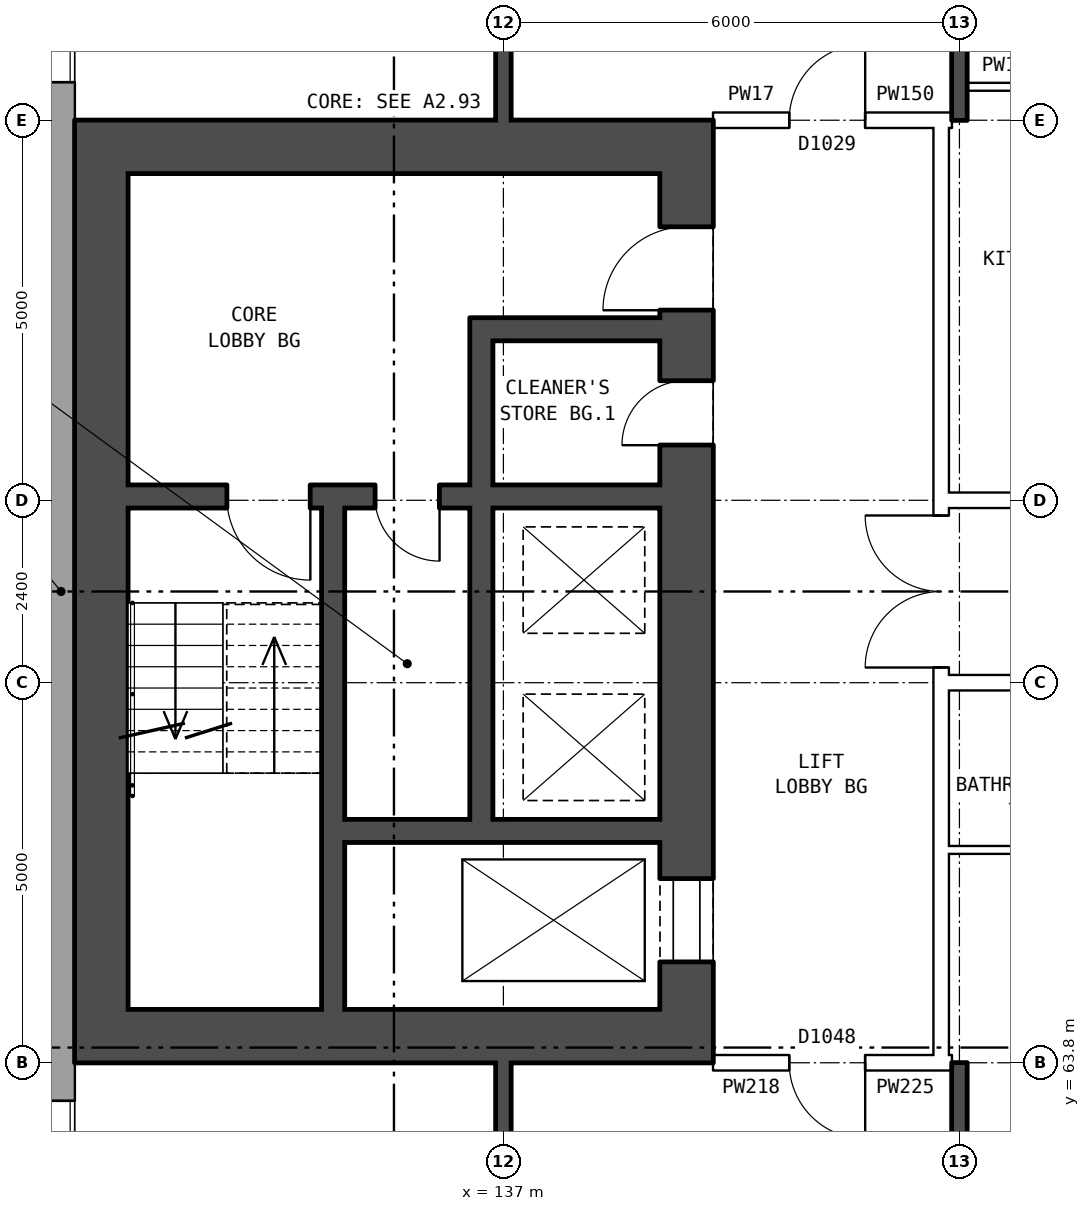
"""IFC4 building model, lengths in metres.
Left out: names, types, materials, properties, quantities, classifications, styles, units other than length and angle.
Written with IfcOpenShell. Run it as: python <this file> out.ifc"""

import sys

from ifc_helpers import new_model, si_unit, direction, frame, frame_2d, origin, place, context, subcontext, project, spatial, rectangle, extrude, element, fill, save


model = new_model("IFC4")
c1 = context("Model", 3, precision=1e-05, world=origin(), true_north=direction((0.0, 1.0)))
c2 = subcontext(c1, "Body", "Model", "MODEL_VIEW")
j1 = project(units=[si_unit("LENGTHUNIT", "METRE"), si_unit("PLANEANGLEUNIT", "RADIAN")], contexts=[c1])
p1 = place(None, origin())
s1 = spatial("IfcSite", under=j1, at=p1, CompositionType="ELEMENT")
p2 = place(p1, origin())
s2 = spatial("IfcBuilding", under=s1, at=p2, CompositionType="ELEMENT")
p3 = place(p2, frame((0.0, 0.0, 84.0)))
s3 = spatial("IfcBuildingStorey", under=s2, at=p3, CompositionType="ELEMENT", Elevation=84.0)
p4 = place(p3, frame((131.18, 82.925, 0.0), z_axis=(0.0, 0.0, 1.0), x_axis=(0.0, -1.0, 0.0)))
e1 = element("IfcWall", 1, at=p4, inside=s3, PredefinedType="STANDARD", context=c2, shape_type="SweptSolid", body=[
    extrude(rectangle(XDim=25.851, YDim=0.36, at=frame_2d((12.925, 0.0))), origin(), (0.0, 0.0, 1.0), 2.85),
])
p5 = place(p4, frame((1.075, 0.0, 0.8)))
e2 = element("IfcOpeningElement", 2, at=p5, cuts=e1, PredefinedType="OPENING", context=c2, shape_type="SweptSolid", body=[
    extrude(rectangle(XDim=1.2, YDim=1.2, at=frame_2d((0.6, 0.6))), frame((0.0, 0.19, 0.0), z_axis=(0.0, -1.0, 0.0), x_axis=(1.0, 0.0, 0.0)), (0.0, 0.0, 1.0), 0.38),
])
p6 = place(p4, frame((4.625, 0.0, 0.8)))
e3 = element("IfcOpeningElement", 3, at=p6, cuts=e1, PredefinedType="OPENING", context=c2, shape_type="SweptSolid", body=[
    extrude(rectangle(XDim=1.6, YDim=1.8, at=frame_2d((0.8, 0.9))), frame((0.0, 0.19, 0.0), z_axis=(0.0, -1.0, 0.0), x_axis=(1.0, 0.0, 0.0)), (0.0, 0.0, 1.0), 0.38),
])
p7 = place(p4, frame((19.625, 0.0, 0.8)))
e4 = element("IfcOpeningElement", 4, at=p7, cuts=e1, PredefinedType="OPENING", context=c2, shape_type="SweptSolid", body=[
    extrude(rectangle(XDim=1.6, YDim=1.8, at=frame_2d((0.8, 0.9))), frame((0.0, 0.19, 0.0), z_axis=(0.0, -1.0, 0.0), x_axis=(1.0, 0.0, 0.0)), (0.0, 0.0, 1.0), 0.38),
])
p8 = place(p4, frame((21.525, 0.0, 1.7)))
e5 = element("IfcOpeningElement", 5, at=p8, cuts=e1, PredefinedType="OPENING", context=c2, shape_type="SweptSolid", body=[
    extrude(rectangle(XDim=0.6, YDim=0.9, at=frame_2d((0.3, 0.45))), frame((0.0, 0.19, 0.0), z_axis=(0.0, -1.0, 0.0), x_axis=(1.0, 0.0, 0.0)), (0.0, 0.0, 1.0), 0.38),
])
p9 = place(p4, frame((3.725, 0.0, 1.7)))
e6 = element("IfcOpeningElement", 6, at=p9, cuts=e1, PredefinedType="OPENING", context=c2, shape_type="SweptSolid", body=[
    extrude(rectangle(XDim=0.6, YDim=0.9, at=frame_2d((0.3, 0.45))), frame((0.0, 0.19, 0.0), z_axis=(0.0, -1.0, 0.0), x_axis=(1.0, 0.0, 0.0)), (0.0, 0.0, 1.0), 0.38),
])
p10 = place(p4, frame((23.125, 0.0, 0.8)))
e7 = element("IfcOpeningElement", 7, at=p10, cuts=e1, PredefinedType="OPENING", context=c2, shape_type="SweptSolid", body=[
    extrude(rectangle(XDim=1.6, YDim=0.9, at=frame_2d((0.8, 0.45))), frame((0.0, 0.19, 0.0), z_axis=(0.0, -1.0, 0.0), x_axis=(1.0, 0.0, 0.0)), (0.0, 0.0, 1.0), 0.38),
])
p11 = place(p3, frame((139.41, 64.5, 0.0), z_axis=(0.0, 0.0, 1.0), x_axis=(0.0, 1.0, 0.0)))
e8 = element("IfcWall", 8, at=p11, inside=s3, PredefinedType="SHEAR", context=c2, shape_type="SweptSolid", body=[
    extrude(rectangle(XDim=11.0, YDim=0.7, at=frame_2d((5.5, 0.0))), origin(), (0.0, 0.0, 1.0), 2.85),
])
p12 = place(p11, frame((0.625, 0.0, 0.0)))
e9 = element("IfcOpeningElement", 9, at=p12, cuts=e8, PredefinedType="OPENING", context=c2, shape_type="SweptSolid", body=[
    extrude(rectangle(XDim=1.1, YDim=2.1, at=frame_2d((0.55, 1.05))), frame((0.0, 0.36, 0.0), z_axis=(0.0, -1.0, 0.0), x_axis=(1.0, 0.0, 0.0)), (0.0, 0.0, 1.0), 0.72),
])
p13 = place(p11, frame((9.2, 0.0, 0.0)))
e10 = element("IfcOpeningElement", 10, at=p13, cuts=e8, PredefinedType="OPENING", context=c2, shape_type="SweptSolid", body=[
    extrude(rectangle(XDim=1.1, YDim=2.1, at=frame_2d((0.55, 1.05))), frame((0.0, 0.36, 0.0), z_axis=(0.0, -1.0, 0.0), x_axis=(1.0, 0.0, 0.0)), (0.0, 0.0, 1.0), 0.72),
])
p14 = place(p11, frame((7.425, 0.0, 0.0)))
e11 = element("IfcOpeningElement", 11, at=p14, cuts=e8, PredefinedType="OPENING", context=c2, shape_type="SweptSolid", body=[
    extrude(rectangle(XDim=0.85, YDim=2.1, at=frame_2d((0.425, 1.05))), frame((0.0, 0.36, 0.0), z_axis=(0.0, -1.0, 0.0), x_axis=(1.0, 0.0, 0.0)), (0.0, 0.0, 1.0), 0.72),
])
p15 = place(p3, frame((131.71, 64.5, 0.0), z_axis=(0.0, 0.0, 1.0), x_axis=(0.0, 1.0, 0.0)))
e12 = element("IfcWall", 12, at=p15, inside=s3, PredefinedType="SHEAR", context=c2, shape_type="SweptSolid", body=[
    extrude(rectangle(XDim=11.0, YDim=0.7, at=frame_2d((5.5, 0.0))), origin(), (0.0, 0.0, 1.0), 2.85),
])
for number, where, z_axis, x_axis in (
    (13, (139.76, 64.15, 0.0), (0.0, 0.0, 1.0), (-1.0, 0.0, 0.0)),
    (14, (139.76, 75.85, 0.0), (0.0, 0.0, 1.0), (-1.0, 0.0, 0.0)),
):
    element("IfcWall", number, at=place(p3, frame(where, z_axis=z_axis, x_axis=x_axis)), inside=s3, PredefinedType="SHEAR", context=c2, shape_type="SweptSolid", body=[
        extrude(rectangle(XDim=8.4, YDim=0.7, at=frame_2d((4.2, 0.0))), origin(), (0.0, 0.0, 1.0), 2.85),
    ])
p16 = place(p3, frame((139.06, 66.85, 0.0), z_axis=(0.0, 0.0, 1.0), x_axis=(-1.0, 0.0, 0.0)))
e15 = element("IfcWall", 15, at=p16, inside=s3, PredefinedType="SHEAR", context=c2, shape_type="SweptSolid", body=[
    extrude(rectangle(XDim=4.15, YDim=0.3, at=frame_2d((2.075, 0.0))), origin(), (0.0, 0.0, 1.0), 2.85),
])
p17 = place(p3, frame((139.06, 71.25, 0.0), z_axis=(0.0, 0.0, 1.0), x_axis=(-1.0, 0.0, 0.0)))
e16 = element("IfcWall", 16, at=p17, inside=s3, PredefinedType="SHEAR", context=c2, shape_type="SweptSolid", body=[
    extrude(rectangle(XDim=7.0, YDim=0.3, at=frame_2d((3.5, 0.0))), origin(), (0.0, 0.0, 1.0), 2.85),
])
p18 = place(p17, frame((4.6, 0.0, 0.0)))
e17 = element("IfcOpeningElement", 17, at=p18, cuts=e16, PredefinedType="OPENING", context=c2, shape_type="SweptSolid", body=[
    extrude(rectangle(XDim=1.1, YDim=2.1, at=frame_2d((0.55, 1.05))), frame((0.0, 0.16, 0.0), z_axis=(0.0, -1.0, 0.0), x_axis=(1.0, 0.0, 0.0)), (0.0, 0.0, 1.0), 0.32),
])
p19 = place(p17, frame((2.9, 0.0, 0.0)))
e18 = element("IfcOpeningElement", 18, at=p19, cuts=e16, PredefinedType="OPENING", context=c2, shape_type="SweptSolid", body=[
    extrude(rectangle(XDim=0.85, YDim=2.1, at=frame_2d((0.425, 1.05))), frame((0.0, 0.16, 0.0), z_axis=(0.0, -1.0, 0.0), x_axis=(1.0, 0.0, 0.0)), (0.0, 0.0, 1.0), 0.32),
])
p20 = place(p3, frame((139.06, 73.45, 0.0), z_axis=(0.0, 0.0, 1.0), x_axis=(-1.0, 0.0, 0.0)))
e19 = element("IfcWall", 19, at=p20, inside=s3, PredefinedType="SHEAR", context=c2, shape_type="SweptSolid", body=[
    extrude(rectangle(XDim=2.2, YDim=0.3, at=frame_2d((1.1, 0.0))), origin(), (0.0, 0.0, 1.0), 2.85),
])
p21 = place(p3, frame((136.71, 67.0, 0.0), z_axis=(0.0, 0.0, 1.0), x_axis=(0.0, 1.0, 0.0)))
e20 = element("IfcWall", 20, at=p21, inside=s3, PredefinedType="SHEAR", context=c2, shape_type="SweptSolid", body=[
    extrude(rectangle(XDim=4.1, YDim=0.3, at=frame_2d((2.05, 0.0))), origin(), (0.0, 0.0, 1.0), 2.85),
])
p22 = place(p3, frame((136.71, 71.4, 0.0), z_axis=(0.0, 0.0, 1.0), x_axis=(0.0, 1.0, 0.0)))
e21 = element("IfcWall", 21, at=p22, inside=s3, PredefinedType="SHEAR", context=c2, shape_type="SweptSolid", body=[
    extrude(rectangle(XDim=2.2, YDim=0.3, at=frame_2d((1.1, 0.0))), origin(), (0.0, 0.0, 1.0), 2.85),
])
p23 = place(p3, frame((134.76, 64.5, 0.0), z_axis=(0.0, 0.0, 1.0), x_axis=(0.0, 1.0, 0.0)))
e22 = element("IfcWall", 22, at=p23, inside=s3, PredefinedType="SHEAR", context=c2, shape_type="SweptSolid", body=[
    extrude(rectangle(XDim=6.6, YDim=0.3, at=frame_2d((3.3, 0.0))), origin(), (0.0, 0.0, 1.0), 2.85),
])
p24 = place(p3, frame((142.76, 63.9, 0.0), z_axis=(0.0, 0.0, 1.0), x_axis=(0.0, 1.0, 0.0)))
e23 = element("IfcWall", 23, at=p24, inside=s3, PredefinedType="PARTITIONING", context=c2, shape_type="SweptSolid", body=[
    extrude(rectangle(XDim=12.2, YDim=0.2, at=frame_2d((6.1, 0.0))), origin(), (0.0, 0.0, 1.0), 2.85),
])
p25 = place(p24, frame((5.1, 0.0, 0.0)))
e24 = element("IfcOpeningElement", 24, at=p25, cuts=e23, PredefinedType="OPENING", context=c2, shape_type="SweptSolid", body=[
    extrude(rectangle(XDim=2.0, YDim=2.1, at=frame_2d((1.0, 1.05))), frame((0.0, 0.11, 0.0), z_axis=(0.0, -1.0, 0.0), x_axis=(1.0, 0.0, 0.0)), (0.0, 0.0, 1.0), 0.22),
])
p26 = place(p3, frame((139.76, 63.8, 0.0), z_axis=(0.0, 0.0, 1.0), x_axis=(1.0, 0.0, 0.0)))
e25 = element("IfcWall", 25, at=p26, inside=s3, PredefinedType="PARTITIONING", context=c2, shape_type="SweptSolid", body=[
    extrude(rectangle(XDim=3.0, YDim=0.2, at=frame_2d((1.5, 0.0))), origin(), (0.0, 0.0, 1.0), 2.85),
])
p27 = place(p26, frame((1.0, 0.0, 0.0)))
e26 = element("IfcOpeningElement", 26, at=p27, cuts=e25, PredefinedType="OPENING", context=c2, shape_type="SweptSolid", body=[
    extrude(rectangle(XDim=1.0, YDim=2.1, at=frame_2d((0.5, 1.05))), frame((0.0, 0.11, 0.0), z_axis=(0.0, -1.0, 0.0), x_axis=(1.0, 0.0, 0.0)), (0.0, 0.0, 1.0), 0.22),
])
p28 = place(p3, frame((142.76, 63.8, 0.0), z_axis=(0.0, 0.0, 1.0), x_axis=(1.0, 0.0, 0.0)))
e27 = element("IfcWall", 27, at=p28, inside=s3, PredefinedType="PARTITIONING", context=c2, shape_type="SweptSolid", body=[
    extrude(rectangle(XDim=0.14, YDim=0.2, at=frame_2d((0.07, 0.0))), origin(), (0.0, 0.0, 1.0), 2.85),
])
p29 = place(p3, frame((142.76, 66.6, 0.0), z_axis=(0.0, 0.0, 1.0), x_axis=(1.0, 0.0, 0.0)))
e28 = element("IfcWall", 28, at=p29, inside=s3, PredefinedType="PARTITIONING", context=c2, shape_type="SweptSolid", body=[
    extrude(rectangle(XDim=3.24, YDim=0.1, at=frame_2d((1.62, 0.0))), origin(), (0.0, 0.0, 1.0), 2.85),
])
p30 = place(p3, frame((142.76, 68.8, 0.0), z_axis=(0.0, 0.0, 1.0), x_axis=(1.0, 0.0, 0.0)))
e29 = element("IfcWall", 29, at=p30, inside=s3, PredefinedType="PARTITIONING", context=c2, shape_type="SweptSolid", body=[
    extrude(rectangle(XDim=14.48, YDim=0.2, at=frame_2d((7.24, 0.0))), origin(), (0.0, 0.0, 1.0), 2.85),
])
p31 = place(p30, frame((4.24, 0.0, 0.0)))
e30 = element("IfcOpeningElement", 30, at=p31, cuts=e29, PredefinedType="OPENING", context=c2, shape_type="SweptSolid", body=[
    extrude(rectangle(XDim=1.0, YDim=2.1, at=frame_2d((0.5, 1.05))), frame((0.0, 0.11, 0.0), z_axis=(0.0, -1.0, 0.0), x_axis=(1.0, 0.0, 0.0)), (0.0, 0.0, 1.0), 0.22),
])
p32 = place(p30, frame((10.24, 0.0, 0.0)))
e31 = element("IfcOpeningElement", 31, at=p32, cuts=e29, PredefinedType="OPENING", context=c2, shape_type="SweptSolid", body=[
    extrude(rectangle(XDim=1.0, YDim=2.1, at=frame_2d((0.5, 1.05))), frame((0.0, 0.11, 0.0), z_axis=(0.0, -1.0, 0.0), x_axis=(1.0, 0.0, 0.0)), (0.0, 0.0, 1.0), 0.22),
])
p33 = place(p3, frame((142.76, 71.2, 0.0), z_axis=(0.0, 0.0, 1.0), x_axis=(1.0, 0.0, 0.0)))
e32 = element("IfcWall", 32, at=p33, inside=s3, PredefinedType="PARTITIONING", context=c2, shape_type="SweptSolid", body=[
    extrude(rectangle(XDim=14.48, YDim=0.2, at=frame_2d((7.24, 0.0))), origin(), (0.0, 0.0, 1.0), 2.85),
])
p34 = place(p33, frame((1.12, 0.0, 0.0)))
e33 = element("IfcOpeningElement", 33, at=p34, cuts=e32, PredefinedType="OPENING", context=c2, shape_type="SweptSolid", body=[
    extrude(rectangle(XDim=1.0, YDim=2.1, at=frame_2d((0.5, 1.05))), frame((0.0, 0.11, 0.0), z_axis=(0.0, -1.0, 0.0), x_axis=(1.0, 0.0, 0.0)), (0.0, 0.0, 1.0), 0.22),
])
p35 = place(p33, frame((10.24, 0.0, 0.0)))
e34 = element("IfcOpeningElement", 34, at=p35, cuts=e32, PredefinedType="OPENING", context=c2, shape_type="SweptSolid", body=[
    extrude(rectangle(XDim=1.0, YDim=2.1, at=frame_2d((0.5, 1.05))), frame((0.0, 0.11, 0.0), z_axis=(0.0, -1.0, 0.0), x_axis=(1.0, 0.0, 0.0)), (0.0, 0.0, 1.0), 0.22),
])
p36 = place(p3, frame((139.76, 76.2, 0.0), z_axis=(0.0, 0.0, 1.0), x_axis=(1.0, 0.0, 0.0)))
e35 = element("IfcWall", 35, at=p36, inside=s3, PredefinedType="PARTITIONING", context=c2, shape_type="SweptSolid", body=[
    extrude(rectangle(XDim=3.0, YDim=0.2, at=frame_2d((1.5, 0.0))), origin(), (0.0, 0.0, 1.0), 2.85),
])
p37 = place(p36, frame((1.0, 0.0, 0.0)))
e36 = element("IfcOpeningElement", 36, at=p37, cuts=e35, PredefinedType="OPENING", context=c2, shape_type="SweptSolid", body=[
    extrude(rectangle(XDim=1.0, YDim=2.1, at=frame_2d((0.5, 1.05))), frame((0.0, 0.11, 0.0), z_axis=(0.0, -1.0, 0.0), x_axis=(1.0, 0.0, 0.0)), (0.0, 0.0, 1.0), 0.22),
])
p38 = place(p3, frame((142.76, 76.2, 0.0), z_axis=(0.0, 0.0, 1.0), x_axis=(1.0, 0.0, 0.0)))
e37 = element("IfcWall", 37, at=p38, inside=s3, PredefinedType="PARTITIONING", context=c2, shape_type="SweptSolid", body=[
    extrude(rectangle(XDim=0.14, YDim=0.2, at=frame_2d((0.07, 0.0))), origin(), (0.0, 0.0, 1.0), 2.85),
])
p39 = place(p3, frame((143.1, 76.64, 0.0), z_axis=(0.0, 0.0, 1.0), x_axis=(1.0, 0.0, 0.0)))
e38 = element("IfcWall", 38, at=p39, inside=s3, PredefinedType="PARTITIONING", context=c2, shape_type="SweptSolid", body=[
    extrude(rectangle(XDim=2.9, YDim=0.1, at=frame_2d((1.45, 0.0))), origin(), (0.0, 0.0, 1.0), 2.85),
])
p40 = place(p39, frame((1.0, 0.0, 0.0)))
e39 = element("IfcOpeningElement", 39, at=p40, cuts=e38, PredefinedType="OPENING", context=c2, shape_type="SweptSolid", body=[
    extrude(rectangle(XDim=0.9, YDim=2.1, at=frame_2d((0.45, 1.05))), frame((0.0, 0.06, 0.0), z_axis=(0.0, -1.0, 0.0), x_axis=(1.0, 0.0, 0.0)), (0.0, 0.0, 1.0), 0.12),
])
p41 = place(p3, frame((137.0, 54.36, 0.0), z_axis=(0.0, 0.0, 1.0), x_axis=(0.0, 1.0, 0.0)))
e40 = element("IfcWall", 40, at=p41, inside=s3, PredefinedType="SOLIDWALL", context=c2, shape_type="SweptSolid", body=[
    extrude(rectangle(XDim=9.44, YDim=0.2, at=frame_2d((4.72, 0.0))), origin(), (0.0, 0.0, 1.0), 2.85),
])
p42 = place(p41, frame((1.37, 0.0, 0.0)))
e41 = element("IfcOpeningElement", 41, at=p42, cuts=e40, PredefinedType="OPENING", context=c2, shape_type="SweptSolid", body=[
    extrude(rectangle(XDim=0.9, YDim=2.1, at=frame_2d((0.45, 1.05))), frame((0.0, 0.11, 0.0), z_axis=(0.0, -1.0, 0.0), x_axis=(1.0, 0.0, 0.0)), (0.0, 0.0, 1.0), 0.22),
])
p43 = place(p41, frame((7.34, 0.0, 0.0)))
e42 = element("IfcOpeningElement", 42, at=p43, cuts=e40, PredefinedType="OPENING", context=c2, shape_type="SweptSolid", body=[
    extrude(rectangle(XDim=0.9, YDim=2.1, at=frame_2d((0.45, 1.05))), frame((0.0, 0.11, 0.0), z_axis=(0.0, -1.0, 0.0), x_axis=(1.0, 0.0, 0.0)), (0.0, 0.0, 1.0), 0.22),
])
p44 = place(p3, frame((137.0, 76.2, 0.0), z_axis=(0.0, 0.0, 1.0), x_axis=(0.0, 1.0, 0.0)))
e43 = element("IfcWall", 43, at=p44, inside=s3, PredefinedType="SOLIDWALL", context=c2, shape_type="SweptSolid", body=[
    extrude(rectangle(XDim=9.44, YDim=0.2, at=frame_2d((4.72, 0.0))), origin(), (0.0, 0.0, 1.0), 2.85),
])
p45 = place(p44, frame((1.2, 0.0, 0.0)))
e44 = element("IfcOpeningElement", 44, at=p45, cuts=e43, PredefinedType="OPENING", context=c2, shape_type="SweptSolid", body=[
    extrude(rectangle(XDim=0.9, YDim=2.1, at=frame_2d((0.45, 1.05))), frame((0.0, 0.11, 0.0), z_axis=(0.0, -1.0, 0.0), x_axis=(1.0, 0.0, 0.0)), (0.0, 0.0, 1.0), 0.22),
])
for number, where, z_axis, x_axis in (
    (45, (143.0, 54.36, 0.0), (0.0, 0.0, 1.0), (0.0, 1.0, 0.0)),
    (46, (143.0, 76.2, 0.0), (0.0, 0.0, 1.0), (0.0, 1.0, 0.0)),
):
    element("IfcWall", number, at=place(p3, frame(where, z_axis=z_axis, x_axis=x_axis)), inside=s3, PredefinedType="SOLIDWALL", context=c2, shape_type="SweptSolid", body=[
        extrude(rectangle(XDim=9.44, YDim=0.2, at=frame_2d((4.72, 0.0))), origin(), (0.0, 0.0, 1.0), 2.85),
    ])
p46 = place(p6, origin())
e47 = element("IfcWindow", 47, at=p46, inside=s3, PartitioningType="SINGLE_PANEL", PredefinedType="WINDOW", context=c2, shape_type="SweptSolid", body=[
    extrude(rectangle(XDim=1.6, YDim=1.8, at=frame_2d((0.8, 0.9))), frame((0.0, 0.15, 0.0), z_axis=(0.0, -1.0, 0.0), x_axis=(1.0, 0.0, 0.0)), (0.0, 0.0, 1.0), 0.06),
])
fill(e3, e47)
p47 = place(p7, origin())
e48 = element("IfcWindow", 48, at=p47, inside=s3, PartitioningType="SINGLE_PANEL", PredefinedType="WINDOW", context=c2, shape_type="SweptSolid", body=[
    extrude(rectangle(XDim=1.6, YDim=1.8, at=frame_2d((0.8, 0.9))), frame((0.0, 0.15, 0.0), z_axis=(0.0, -1.0, 0.0), x_axis=(1.0, 0.0, 0.0)), (0.0, 0.0, 1.0), 0.06),
])
fill(e4, e48)
p48 = place(p12, origin())
e49 = element("IfcDoor", 49, at=p48, inside=s3, OperationType="DOUBLE_DOOR_SLIDING", PredefinedType="DOOR", context=c2, shape_type="SweptSolid", body=[
    extrude(rectangle(XDim=1.1, YDim=2.1, at=frame_2d((0.55, 1.05))), frame((0.0, 0.335, 0.0), z_axis=(0.0, -1.0, 0.0), x_axis=(1.0, 0.0, 0.0)), (0.0, 0.0, 1.0), 0.05),
])
fill(e9, e49)
p49 = place(p13, origin())
e50 = element("IfcDoor", 50, at=p49, inside=s3, OperationType="SINGLE_SWING_LEFT", PredefinedType="DOOR", context=c2, shape_type="SweptSolid", body=[
    extrude(rectangle(XDim=1.1, YDim=2.1, at=frame_2d((0.55, 1.05))), frame((0.0, 0.335, 0.0), z_axis=(0.0, -1.0, 0.0), x_axis=(1.0, 0.0, 0.0)), (0.0, 0.0, 1.0), 0.05),
])
fill(e10, e50)
p50 = place(p18, origin())
e51 = element("IfcDoor", 51, at=p50, inside=s3, OperationType="SINGLE_SWING_LEFT", PredefinedType="DOOR", context=c2, shape_type="SweptSolid", body=[
    extrude(rectangle(XDim=1.1, YDim=2.1, at=frame_2d((0.55, 1.05))), frame((0.0, 0.025, 0.0), z_axis=(0.0, -1.0, 0.0), x_axis=(1.0, 0.0, 0.0)), (0.0, 0.0, 1.0), 0.05),
])
fill(e17, e51)
p51 = place(p14, origin())
e52 = element("IfcDoor", 52, at=p51, inside=s3, OperationType="SINGLE_SWING_LEFT", PredefinedType="DOOR", context=c2, shape_type="SweptSolid", body=[
    extrude(rectangle(XDim=0.85, YDim=2.1, at=frame_2d((0.425, 1.05))), frame((0.0, 0.335, 0.0), z_axis=(0.0, -1.0, 0.0), x_axis=(1.0, 0.0, 0.0)), (0.0, 0.0, 1.0), 0.05),
])
fill(e11, e52)
p52 = place(p19, origin())
e53 = element("IfcDoor", 53, at=p52, inside=s3, OperationType="SINGLE_SWING_LEFT", PredefinedType="DOOR", context=c2, shape_type="SweptSolid", body=[
    extrude(rectangle(XDim=0.85, YDim=2.1, at=frame_2d((0.425, 1.05))), frame((0.0, 0.025, 0.0), z_axis=(0.0, -1.0, 0.0), x_axis=(1.0, 0.0, 0.0)), (0.0, 0.0, 1.0), 0.05),
])
fill(e18, e53)
p53 = place(p25, origin())
e54 = element("IfcDoor", 54, at=p53, inside=s3, OperationType="DOUBLE_DOOR_SINGLE_SWING", PredefinedType="DOOR", context=c2, shape_type="SweptSolid", body=[
    extrude(rectangle(XDim=2.0, YDim=2.1, at=frame_2d((1.0, 1.05))), frame((0.0, 0.025, 0.0), z_axis=(0.0, -1.0, 0.0), x_axis=(1.0, 0.0, 0.0)), (0.0, 0.0, 1.0), 0.05),
])
fill(e24, e54)
p54 = place(p27, frame((1.0, 0.0, 0.0), z_axis=(0.0, 0.0, 1.0), x_axis=(-1.0, 0.0, 0.0)))
e55 = element("IfcDoor", 55, at=p54, inside=s3, OperationType="SINGLE_SWING_LEFT", PredefinedType="DOOR", context=c2, shape_type="SweptSolid", body=[
    extrude(rectangle(XDim=1.0, YDim=2.1, at=frame_2d((0.5, 1.05))), frame((0.0, 0.025, 0.0), z_axis=(0.0, -1.0, 0.0), x_axis=(1.0, 0.0, 0.0)), (0.0, 0.0, 1.0), 0.05),
])
fill(e26, e55)
p55 = place(p37, origin())
e56 = element("IfcDoor", 56, at=p55, inside=s3, OperationType="SINGLE_SWING_RIGHT", PredefinedType="DOOR", context=c2, shape_type="SweptSolid", body=[
    extrude(rectangle(XDim=1.0, YDim=2.1, at=frame_2d((0.5, 1.05))), frame((0.0, 0.025, 0.0), z_axis=(0.0, -1.0, 0.0), x_axis=(1.0, 0.0, 0.0)), (0.0, 0.0, 1.0), 0.05),
])
fill(e36, e56)
save(model, sys.argv[1])
